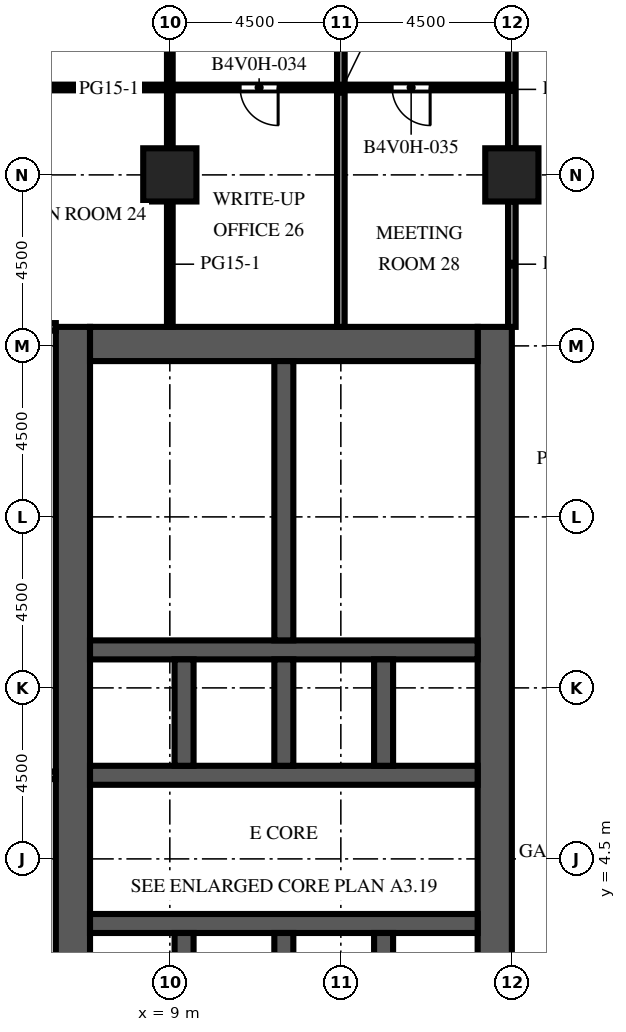
"""IFC4 building model, lengths in metres.
Left out: names, types, materials, properties, quantities, classifications, styles, units other than length and angle.
Written with IfcOpenShell. Run it as: python <this file> out.ifc"""

import sys

from ifc_helpers import new_model, si_unit, direction, frame, frame_2d, origin, origin_2d, place, context, subcontext, project, spatial, rectangle, extrude, element, fill, save


model = new_model("IFC4")
c1 = context("Model", 3, precision=1e-05, world=origin(), true_north=direction((0.0, 1.0)))
c2 = subcontext(c1, "Body", "Model", "MODEL_VIEW")
j1 = project(units=[si_unit("LENGTHUNIT", "METRE"), si_unit("PLANEANGLEUNIT", "RADIAN")], contexts=[c1])
p1 = place(None, origin())
s1 = spatial("IfcSite", under=j1, at=p1, CompositionType="ELEMENT")
p2 = place(p1, origin())
s2 = spatial("IfcBuilding", under=s1, at=p2, CompositionType="ELEMENT")
p3 = place(p2, frame((0.0, 0.0, 116.7)))
s3 = spatial("IfcBuildingStorey", under=s2, at=p3, CompositionType="ELEMENT", Elevation=116.7)
for number, where, z_axis, x_axis in (
    (1, (9.0, 22.5, 0.0), (0.0, 0.0, 1.0), (1.0, 0.0, 0.0)),
    (2, (18.0, 22.5, 0.0), (0.0, 0.0, 1.0), (1.0, 0.0, 0.0)),
):
    element("IfcColumn", number, at=place(p3, frame(where, z_axis=z_axis, x_axis=x_axis)), inside=s3, PredefinedType="COLUMN", context=c2, shape_type="SweptSolid", body=[
        extrude(rectangle(XDim=1.4, YDim=1.4, at=origin_2d()), origin(), (0.0, 0.0, 1.0), 4.1),
    ])
p4 = place(p3, frame((6.45, -9.0, 0.0), z_axis=(0.0, 0.0, 1.0), x_axis=(0.0, 1.0, 0.0)))
e3 = element("IfcWall", 3, at=p4, inside=s3, PredefinedType="SHEAR", context=c2, shape_type="SweptSolid", body=[
    extrude(rectangle(XDim=27.5, YDim=0.9, at=frame_2d((13.75, 0.0))), origin(), (0.0, 0.0, 1.0), 4.1),
])
p5 = place(p4, frame((12.55, 0.0, 0.0)))
e4 = element("IfcOpeningElement", 4, at=p5, cuts=e3, PredefinedType="OPENING", context=c2, shape_type="SweptSolid", body=[
    extrude(rectangle(XDim=2.4, YDim=2.4, at=frame_2d((1.2, 1.2))), frame((0.0, 0.46, 0.0), z_axis=(0.0, -1.0, 0.0), x_axis=(1.0, 0.0, 0.0)), (0.0, 0.0, 1.0), 0.92),
])
p6 = place(p4, frame((3.975, 0.0, 0.0)))
e5 = element("IfcOpeningElement", 5, at=p6, cuts=e3, PredefinedType="OPENING", context=c2, shape_type="SweptSolid", body=[
    extrude(rectangle(XDim=1.2, YDim=2.1, at=frame_2d((0.6, 1.05))), frame((0.0, 0.46, 0.0), z_axis=(0.0, -1.0, 0.0), x_axis=(1.0, 0.0, 0.0)), (0.0, 0.0, 1.0), 0.92),
])
p7 = place(p4, frame((19.485, 0.0, 0.0)))
e6 = element("IfcOpeningElement", 6, at=p7, cuts=e3, PredefinedType="OPENING", context=c2, shape_type="SweptSolid", body=[
    extrude(rectangle(XDim=1.0, YDim=2.1, at=frame_2d((0.5, 1.05))), frame((0.0, 0.46, 0.0), z_axis=(0.0, -1.0, 0.0), x_axis=(1.0, 0.0, 0.0)), (0.0, 0.0, 1.0), 0.92),
])
p8 = place(p4, frame((21.139, 0.0, 0.0)))
e7 = element("IfcOpeningElement", 7, at=p8, cuts=e3, PredefinedType="OPENING", context=c2, shape_type="SweptSolid", body=[
    extrude(rectangle(XDim=1.0, YDim=2.1, at=frame_2d((0.5, 1.05))), frame((0.0, 0.46, 0.0), z_axis=(0.0, -1.0, 0.0), x_axis=(1.0, 0.0, 0.0)), (0.0, 0.0, 1.0), 0.92),
])
p9 = place(p4, frame((23.16, 0.0, 0.0)))
e8 = element("IfcOpeningElement", 8, at=p9, cuts=e3, PredefinedType="OPENING", context=c2, shape_type="SweptSolid", body=[
    extrude(rectangle(XDim=1.0, YDim=2.1, at=frame_2d((0.5, 1.05))), frame((0.0, 0.46, 0.0), z_axis=(0.0, -1.0, 0.0), x_axis=(1.0, 0.0, 0.0)), (0.0, 0.0, 1.0), 0.92),
])
p10 = place(p4, frame((25.181, 0.0, 0.0)))
e9 = element("IfcOpeningElement", 9, at=p10, cuts=e3, PredefinedType="OPENING", context=c2, shape_type="SweptSolid", body=[
    extrude(rectangle(XDim=1.0, YDim=2.1, at=frame_2d((0.5, 1.05))), frame((0.0, 0.46, 0.0), z_axis=(0.0, -1.0, 0.0), x_axis=(1.0, 0.0, 0.0)), (0.0, 0.0, 1.0), 0.92),
])
p11 = place(p3, frame((17.55, -9.0, 0.0), z_axis=(0.0, 0.0, 1.0), x_axis=(0.0, 1.0, 0.0)))
e10 = element("IfcWall", 10, at=p11, inside=s3, PredefinedType="SHEAR", context=c2, shape_type="SweptSolid", body=[
    extrude(rectangle(XDim=27.5, YDim=0.9, at=frame_2d((13.75, 0.0))), origin(), (0.0, 0.0, 1.0), 4.1),
])
p12 = place(p11, frame((12.55, 0.0, 0.0)))
e11 = element("IfcOpeningElement", 11, at=p12, cuts=e10, PredefinedType="OPENING", context=c2, shape_type="SweptSolid", body=[
    extrude(rectangle(XDim=2.4, YDim=2.4, at=frame_2d((1.2, 1.2))), frame((0.0, 0.46, 0.0), z_axis=(0.0, -1.0, 0.0), x_axis=(1.0, 0.0, 0.0)), (0.0, 0.0, 1.0), 0.92),
])
p13 = place(p11, frame((6.825, 0.0, 0.0)))
e12 = element("IfcOpeningElement", 12, at=p13, cuts=e10, PredefinedType="OPENING", context=c2, shape_type="SweptSolid", body=[
    extrude(rectangle(XDim=1.2, YDim=2.1, at=frame_2d((0.6, 1.05))), frame((0.0, 0.46, 0.0), z_axis=(0.0, -1.0, 0.0), x_axis=(1.0, 0.0, 0.0)), (0.0, 0.0, 1.0), 0.92),
])
p14 = place(p11, frame((19.475, 0.0, 0.0)))
e13 = element("IfcOpeningElement", 13, at=p14, cuts=e10, PredefinedType="OPENING", context=c2, shape_type="SweptSolid", body=[
    extrude(rectangle(XDim=1.2, YDim=2.1, at=frame_2d((0.6, 1.05))), frame((0.0, 0.46, 0.0), z_axis=(0.0, -1.0, 0.0), x_axis=(1.0, 0.0, 0.0)), (0.0, 0.0, 1.0), 0.92),
])
p15 = place(p3, frame((6.9, 18.05, 0.0), z_axis=(0.0, 0.0, 1.0), x_axis=(1.0, 0.0, 0.0)))
e14 = element("IfcWall", 14, at=p15, inside=s3, PredefinedType="SHEAR", context=c2, shape_type="SweptSolid", body=[
    extrude(rectangle(XDim=10.2, YDim=0.9, at=frame_2d((5.1, 0.0))), origin(), (0.0, 0.0, 1.0), 4.1),
])
p16 = place(p3, frame((6.9, 2.8, 0.0), z_axis=(0.0, 0.0, 1.0), x_axis=(1.0, 0.0, 0.0)))
e15 = element("IfcWall", 15, at=p16, inside=s3, PredefinedType="SHEAR", context=c2, shape_type="SweptSolid", body=[
    extrude(rectangle(XDim=10.2, YDim=0.5, at=frame_2d((5.1, 0.0))), origin(), (0.0, 0.0, 1.0), 4.1),
])
p17 = place(p16, frame((0.562, 0.0, 0.0)))
e16 = element("IfcOpeningElement", 16, at=p17, cuts=e15, PredefinedType="OPENING", context=c2, shape_type="SweptSolid", body=[
    extrude(rectangle(XDim=1.1, YDim=2.1, at=frame_2d((0.55, 1.05))), frame((0.0, 0.26, 0.0), z_axis=(0.0, -1.0, 0.0), x_axis=(1.0, 0.0, 0.0)), (0.0, 0.0, 1.0), 0.52),
])
p18 = place(p16, frame((3.238, 0.0, 0.0)))
e17 = element("IfcOpeningElement", 17, at=p18, cuts=e15, PredefinedType="OPENING", context=c2, shape_type="SweptSolid", body=[
    extrude(rectangle(XDim=1.1, YDim=2.1, at=frame_2d((0.55, 1.05))), frame((0.0, 0.26, 0.0), z_axis=(0.0, -1.0, 0.0), x_axis=(1.0, 0.0, 0.0)), (0.0, 0.0, 1.0), 0.52),
])
p19 = place(p16, frame((8.538, 0.0, 0.0)))
e18 = element("IfcOpeningElement", 18, at=p19, cuts=e15, PredefinedType="OPENING", context=c2, shape_type="SweptSolid", body=[
    extrude(rectangle(XDim=1.1, YDim=2.1, at=frame_2d((0.55, 1.05))), frame((0.0, 0.26, 0.0), z_axis=(0.0, -1.0, 0.0), x_axis=(1.0, 0.0, 0.0)), (0.0, 0.0, 1.0), 0.52),
])
p20 = place(p3, frame((6.9, 6.7, 0.0), z_axis=(0.0, 0.0, 1.0), x_axis=(1.0, 0.0, 0.0)))
e19 = element("IfcWall", 19, at=p20, inside=s3, PredefinedType="SHEAR", context=c2, shape_type="SweptSolid", body=[
    extrude(rectangle(XDim=10.2, YDim=0.5, at=frame_2d((5.1, 0.0))), origin(), (0.0, 0.0, 1.0), 4.1),
])
p21 = place(p20, frame((0.562, 0.0, 0.0)))
e20 = element("IfcOpeningElement", 20, at=p21, cuts=e19, PredefinedType="OPENING", context=c2, shape_type="SweptSolid", body=[
    extrude(rectangle(XDim=1.1, YDim=2.1, at=frame_2d((0.55, 1.05))), frame((0.0, 0.26, 0.0), z_axis=(0.0, -1.0, 0.0), x_axis=(1.0, 0.0, 0.0)), (0.0, 0.0, 1.0), 0.52),
])
p22 = place(p20, frame((3.288, 0.0, 0.0)))
e21 = element("IfcOpeningElement", 21, at=p22, cuts=e19, PredefinedType="OPENING", context=c2, shape_type="SweptSolid", body=[
    extrude(rectangle(XDim=1.0, YDim=2.1, at=frame_2d((0.5, 1.05))), frame((0.0, 0.26, 0.0), z_axis=(0.0, -1.0, 0.0), x_axis=(1.0, 0.0, 0.0)), (0.0, 0.0, 1.0), 0.52),
])
p23 = place(p20, frame((5.913, 0.0, 0.0)))
e22 = element("IfcOpeningElement", 22, at=p23, cuts=e19, PredefinedType="OPENING", context=c2, shape_type="SweptSolid", body=[
    extrude(rectangle(XDim=1.0, YDim=2.1, at=frame_2d((0.5, 1.05))), frame((0.0, 0.26, 0.0), z_axis=(0.0, -1.0, 0.0), x_axis=(1.0, 0.0, 0.0)), (0.0, 0.0, 1.0), 0.52),
])
p24 = place(p20, frame((8.587, 0.0, 0.0)))
e23 = element("IfcOpeningElement", 23, at=p24, cuts=e19, PredefinedType="OPENING", context=c2, shape_type="SweptSolid", body=[
    extrude(rectangle(XDim=1.0, YDim=2.1, at=frame_2d((0.5, 1.05))), frame((0.0, 0.26, 0.0), z_axis=(0.0, -1.0, 0.0), x_axis=(1.0, 0.0, 0.0)), (0.0, 0.0, 1.0), 0.52),
])
p25 = place(p3, frame((6.9, 10.0, 0.0), z_axis=(0.0, 0.0, 1.0), x_axis=(1.0, 0.0, 0.0)))
e24 = element("IfcWall", 24, at=p25, inside=s3, PredefinedType="SHEAR", context=c2, shape_type="SweptSolid", body=[
    extrude(rectangle(XDim=10.2, YDim=0.5, at=frame_2d((5.1, 0.0))), origin(), (0.0, 0.0, 1.0), 4.1),
])
for number, where, z_axis, x_axis in (
    (25, (9.375, -0.25, 0.0), (0.0, 0.0, 1.0), (0.0, 1.0, 0.0)),
    (26, (9.375, 6.95, 0.0), (0.0, 0.0, 1.0), (0.0, 1.0, 0.0)),
    (27, (12.0, -0.25, 0.0), (0.0, 0.0, 1.0), (0.0, 1.0, 0.0)),
    (28, (12.0, 6.95, 0.0), (0.0, 0.0, 1.0), (0.0, 1.0, 0.0)),
    (29, (14.625, -0.25, 0.0), (0.0, 0.0, 1.0), (0.0, 1.0, 0.0)),
    (30, (14.625, 6.95, 0.0), (0.0, 0.0, 1.0), (0.0, 1.0, 0.0)),
):
    element("IfcWall", number, at=place(p3, frame(where, z_axis=z_axis, x_axis=x_axis)), inside=s3, PredefinedType="SHEAR", context=c2, shape_type="SweptSolid", body=[
        extrude(rectangle(XDim=2.8, YDim=0.5, at=frame_2d((1.4, 0.0))), origin(), (0.0, 0.0, 1.0), 4.1),
    ])
p26 = place(p3, frame((12.0, 10.25, 0.0), z_axis=(0.0, 0.0, 1.0), x_axis=(0.0, 1.0, 0.0)))
e31 = element("IfcWall", 31, at=p26, inside=s3, PredefinedType="SHEAR", context=c2, shape_type="SweptSolid", body=[
    extrude(rectangle(XDim=7.35, YDim=0.5, at=frame_2d((3.675, 0.0))), origin(), (0.0, 0.0, 1.0), 4.1),
])
for number, where, z_axis, x_axis in (
    (32, (6.9, 11.72, 0.0), (0.0, 0.0, 1.0), (1.0, 0.0, 0.0)),
    (33, (6.9, 13.558, 0.0), (0.0, 0.0, 1.0), (1.0, 0.0, 0.0)),
    (34, (6.9, 15.762, 0.0), (0.0, 0.0, 1.0), (1.0, 0.0, 0.0)),
):
    element("IfcWall", number, at=place(p3, frame(where, z_axis=z_axis, x_axis=x_axis)), inside=s3, PredefinedType="PARTITIONING", context=c2, shape_type="SweptSolid", body=[
        extrude(rectangle(XDim=4.85, YDim=0.1, at=frame_2d((2.425, 0.0))), origin(), (0.0, 0.0, 1.0), 3.65),
    ])
p27 = place(p3, frame((9.0, 18.5, 0.0), z_axis=(0.0, 0.0, 1.0), x_axis=(0.0, 1.0, 0.0)))
e35 = element("IfcWall", 35, at=p27, inside=s3, PredefinedType="PARTITIONING", context=c2, shape_type="SweptSolid", body=[
    extrude(rectangle(XDim=3.3, YDim=0.15, at=frame_2d((1.65, 0.0))), origin(), (0.0, 0.0, 1.0), 3.65),
])
p28 = place(p3, frame((9.0, 23.2, 0.0), z_axis=(0.0, 0.0, 1.0), x_axis=(0.0, 1.0, 0.0)))
e36 = element("IfcWall", 36, at=p28, inside=s3, PredefinedType="PARTITIONING", context=c2, shape_type="SweptSolid", body=[
    extrude(rectangle(XDim=3.1, YDim=0.15, at=frame_2d((1.55, 0.0))), origin(), (0.0, 0.0, 1.0), 3.65),
])
p29 = place(p3, frame((13.5, 18.5, 0.0), z_axis=(0.0, 0.0, 1.0), x_axis=(0.0, 1.0, 0.0)))
e37 = element("IfcWall", 37, at=p29, inside=s3, PredefinedType="PARTITIONING", context=c2, shape_type="SweptSolid", body=[
    extrude(rectangle(XDim=12.4, YDim=0.2, at=frame_2d((6.2, 0.0))), origin(), (0.0, 0.0, 1.0), 3.65),
])
p30 = place(p3, frame((18.0, 18.5, 0.0), z_axis=(0.0, 0.0, 1.0), x_axis=(0.0, 1.0, 0.0)))
e38 = element("IfcWall", 38, at=p30, inside=s3, PredefinedType="PARTITIONING", context=c2, shape_type="SweptSolid", body=[
    extrude(rectangle(XDim=3.3, YDim=0.2, at=frame_2d((1.65, 0.0))), origin(), (0.0, 0.0, 1.0), 3.65),
])
p31 = place(p3, frame((18.0, 23.2, 0.0), z_axis=(0.0, 0.0, 1.0), x_axis=(0.0, 1.0, 0.0)))
e39 = element("IfcWall", 39, at=p31, inside=s3, PredefinedType="PARTITIONING", context=c2, shape_type="SweptSolid", body=[
    extrude(rectangle(XDim=3.1, YDim=0.2, at=frame_2d((1.55, 0.0))), origin(), (0.0, 0.0, 1.0), 3.65),
])
p32 = place(p3, frame((1.5, 6.7, 0.0), z_axis=(0.0, 0.0, 1.0), x_axis=(1.0, 0.0, 0.0)))
e40 = element("IfcWall", 40, at=p32, inside=s3, PredefinedType="PARTITIONING", context=c2, shape_type="SweptSolid", body=[
    extrude(rectangle(XDim=4.5, YDim=0.2, at=frame_2d((2.25, 0.0))), origin(), (0.0, 0.0, 1.0), 3.65),
])
p33 = place(p32, frame((1.6, 0.0, 0.0)))
e41 = element("IfcOpeningElement", 41, at=p33, cuts=e40, PredefinedType="OPENING", context=c2, shape_type="SweptSolid", body=[
    extrude(rectangle(XDim=1.0, YDim=2.1, at=frame_2d((0.5, 1.05))), frame((0.0, 0.11, 0.0), z_axis=(0.0, -1.0, 0.0), x_axis=(1.0, 0.0, 0.0)), (0.0, 0.0, 1.0), 0.22),
])
p34 = place(p3, frame((1.5, 18.5, 0.0), z_axis=(0.0, 0.0, 1.0), x_axis=(1.0, 0.0, 0.0)))
e42 = element("IfcWall", 42, at=p34, inside=s3, PredefinedType="PARTITIONING", context=c2, shape_type="SweptSolid", body=[
    extrude(rectangle(XDim=4.5, YDim=0.2, at=frame_2d((2.25, 0.0))), origin(), (0.0, 0.0, 1.0), 3.65),
])
p35 = place(p3, frame((18.0, 24.8, 0.0), z_axis=(0.0, 0.0, 1.0), x_axis=(-1.0, 0.0, 0.0)))
e43 = element("IfcWall", 43, at=p35, inside=s3, PredefinedType="PARTITIONING", context=c2, shape_type="SweptSolid", body=[
    extrude(rectangle(XDim=28.5, YDim=0.15, at=frame_2d((14.25, 0.0))), origin(), (0.0, 0.0, 1.0), 3.65),
])
p36 = place(p35, frame((21.4, 0.0, 0.0)))
e44 = element("IfcOpeningElement", 44, at=p36, cuts=e43, PredefinedType="OPENING", context=c2, shape_type="SweptSolid", body=[
    extrude(rectangle(XDim=1.0, YDim=2.1, at=frame_2d((0.5, 1.05))), frame((0.0, 0.085, 0.0), z_axis=(0.0, -1.0, 0.0), x_axis=(1.0, 0.0, 0.0)), (0.0, 0.0, 1.0), 0.17),
])
p37 = place(p35, frame((13.4, 0.0, 0.0)))
e45 = element("IfcOpeningElement", 45, at=p37, cuts=e43, PredefinedType="OPENING", context=c2, shape_type="SweptSolid", body=[
    extrude(rectangle(XDim=1.0, YDim=2.1, at=frame_2d((0.5, 1.05))), frame((0.0, 0.085, 0.0), z_axis=(0.0, -1.0, 0.0), x_axis=(1.0, 0.0, 0.0)), (0.0, 0.0, 1.0), 0.17),
])
p38 = place(p35, frame((6.15, 0.0, 0.0)))
e46 = element("IfcOpeningElement", 46, at=p38, cuts=e43, PredefinedType="OPENING", context=c2, shape_type="SweptSolid", body=[
    extrude(rectangle(XDim=1.0, YDim=2.1, at=frame_2d((0.5, 1.05))), frame((0.0, 0.085, 0.0), z_axis=(0.0, -1.0, 0.0), x_axis=(1.0, 0.0, 0.0)), (0.0, 0.0, 1.0), 0.17),
])
p39 = place(p35, frame((2.15, 0.0, 0.0)))
e47 = element("IfcOpeningElement", 47, at=p39, cuts=e43, PredefinedType="OPENING", context=c2, shape_type="SweptSolid", body=[
    extrude(rectangle(XDim=1.0, YDim=2.1, at=frame_2d((0.5, 1.05))), frame((0.0, 0.085, 0.0), z_axis=(0.0, -1.0, 0.0), x_axis=(1.0, 0.0, 0.0)), (0.0, 0.0, 1.0), 0.17),
])
p40 = place(p17, origin())
e48 = element("IfcDoor", 48, at=p40, inside=s3, OperationType="DOUBLE_DOOR_SLIDING", PredefinedType="DOOR", context=c2, shape_type="SweptSolid", body=[
    extrude(rectangle(XDim=1.1, YDim=2.1, at=frame_2d((0.55, 1.05))), frame((0.0, 0.025, 0.0), z_axis=(0.0, -1.0, 0.0), x_axis=(1.0, 0.0, 0.0)), (0.0, 0.0, 1.0), 0.05),
])
fill(e16, e48)
p41 = place(p18, origin())
e49 = element("IfcDoor", 49, at=p41, inside=s3, OperationType="DOUBLE_DOOR_SLIDING", PredefinedType="DOOR", context=c2, shape_type="SweptSolid", body=[
    extrude(rectangle(XDim=1.1, YDim=2.1, at=frame_2d((0.55, 1.05))), frame((0.0, 0.025, 0.0), z_axis=(0.0, -1.0, 0.0), x_axis=(1.0, 0.0, 0.0)), (0.0, 0.0, 1.0), 0.05),
])
fill(e17, e49)
p42 = place(p19, origin())
e50 = element("IfcDoor", 50, at=p42, inside=s3, OperationType="DOUBLE_DOOR_SLIDING", PredefinedType="DOOR", context=c2, shape_type="SweptSolid", body=[
    extrude(rectangle(XDim=1.1, YDim=2.1, at=frame_2d((0.55, 1.05))), frame((0.0, 0.025, 0.0), z_axis=(0.0, -1.0, 0.0), x_axis=(1.0, 0.0, 0.0)), (0.0, 0.0, 1.0), 0.05),
])
fill(e18, e50)
p43 = place(p21, origin())
e51 = element("IfcDoor", 51, at=p43, inside=s3, OperationType="DOUBLE_DOOR_SLIDING", PredefinedType="DOOR", context=c2, shape_type="SweptSolid", body=[
    extrude(rectangle(XDim=1.1, YDim=2.1, at=frame_2d((0.55, 1.05))), frame((0.0, 0.025, 0.0), z_axis=(0.0, -1.0, 0.0), x_axis=(1.0, 0.0, 0.0)), (0.0, 0.0, 1.0), 0.05),
])
fill(e20, e51)
p44 = place(p5, origin())
e52 = element("IfcDoor", 52, at=p44, inside=s3, OperationType="DOUBLE_DOOR_DOUBLE_SWING", PredefinedType="DOOR", context=c2, shape_type="SweptSolid", body=[
    extrude(rectangle(XDim=2.4, YDim=2.4, at=frame_2d((1.2, 1.2))), frame((0.0, 0.025, 0.0), z_axis=(0.0, -1.0, 0.0), x_axis=(1.0, 0.0, 0.0)), (0.0, 0.0, 1.0), 0.05),
])
fill(e4, e52)
p45 = place(p12, origin())
e53 = element("IfcDoor", 53, at=p45, inside=s3, OperationType="DOUBLE_DOOR_DOUBLE_SWING", PredefinedType="DOOR", context=c2, shape_type="SweptSolid", body=[
    extrude(rectangle(XDim=2.4, YDim=2.4, at=frame_2d((1.2, 1.2))), frame((0.0, 0.025, 0.0), z_axis=(0.0, -1.0, 0.0), x_axis=(1.0, 0.0, 0.0)), (0.0, 0.0, 1.0), 0.05),
])
fill(e11, e53)
p46 = place(p14, frame((1.2, 0.0, 0.0), z_axis=(0.0, 0.0, 1.0), x_axis=(-1.0, 0.0, 0.0)))
e54 = element("IfcDoor", 54, at=p46, inside=s3, OperationType="SINGLE_SWING_LEFT", PredefinedType="DOOR", context=c2, shape_type="SweptSolid", body=[
    extrude(rectangle(XDim=1.2, YDim=2.1, at=frame_2d((0.6, 1.05))), frame((0.0, 0.025, 0.0), z_axis=(0.0, -1.0, 0.0), x_axis=(1.0, 0.0, 0.0)), (0.0, 0.0, 1.0), 0.05),
])
fill(e13, e54)
p47 = place(p22, origin())
e55 = element("IfcDoor", 55, at=p47, inside=s3, OperationType="SINGLE_SWING_RIGHT", PredefinedType="DOOR", context=c2, shape_type="SweptSolid", body=[
    extrude(rectangle(XDim=1.0, YDim=2.1, at=frame_2d((0.5, 1.05))), frame((0.0, 0.025, 0.0), z_axis=(0.0, -1.0, 0.0), x_axis=(1.0, 0.0, 0.0)), (0.0, 0.0, 1.0), 0.05),
])
fill(e21, e55)
p48 = place(p23, origin())
e56 = element("IfcDoor", 56, at=p48, inside=s3, OperationType="SINGLE_SWING_LEFT", PredefinedType="DOOR", context=c2, shape_type="SweptSolid", body=[
    extrude(rectangle(XDim=1.0, YDim=2.1, at=frame_2d((0.5, 1.05))), frame((0.0, 0.025, 0.0), z_axis=(0.0, -1.0, 0.0), x_axis=(1.0, 0.0, 0.0)), (0.0, 0.0, 1.0), 0.05),
])
fill(e22, e56)
p49 = place(p24, origin())
e57 = element("IfcDoor", 57, at=p49, inside=s3, OperationType="SINGLE_SWING_RIGHT", PredefinedType="DOOR", context=c2, shape_type="SweptSolid", body=[
    extrude(rectangle(XDim=1.0, YDim=2.1, at=frame_2d((0.5, 1.05))), frame((0.0, 0.025, 0.0), z_axis=(0.0, -1.0, 0.0), x_axis=(1.0, 0.0, 0.0)), (0.0, 0.0, 1.0), 0.05),
])
fill(e23, e57)
p50 = place(p7, origin())
e58 = element("IfcDoor", 58, at=p50, inside=s3, OperationType="SINGLE_SWING_RIGHT", PredefinedType="DOOR", context=c2, shape_type="SweptSolid", body=[
    extrude(rectangle(XDim=1.0, YDim=2.1, at=frame_2d((0.5, 1.05))), frame((0.0, -0.375, 0.0), z_axis=(0.0, -1.0, 0.0), x_axis=(1.0, 0.0, 0.0)), (0.0, 0.0, 1.0), 0.05),
])
fill(e6, e58)
p51 = place(p8, origin())
e59 = element("IfcDoor", 59, at=p51, inside=s3, OperationType="SINGLE_SWING_LEFT", PredefinedType="DOOR", context=c2, shape_type="SweptSolid", body=[
    extrude(rectangle(XDim=1.0, YDim=2.1, at=frame_2d((0.5, 1.05))), frame((0.0, -0.375, 0.0), z_axis=(0.0, -1.0, 0.0), x_axis=(1.0, 0.0, 0.0)), (0.0, 0.0, 1.0), 0.05),
])
fill(e7, e59)
p52 = place(p9, origin())
e60 = element("IfcDoor", 60, at=p52, inside=s3, OperationType="SINGLE_SWING_RIGHT", PredefinedType="DOOR", context=c2, shape_type="SweptSolid", body=[
    extrude(rectangle(XDim=1.0, YDim=2.1, at=frame_2d((0.5, 1.05))), frame((0.0, -0.375, 0.0), z_axis=(0.0, -1.0, 0.0), x_axis=(1.0, 0.0, 0.0)), (0.0, 0.0, 1.0), 0.05),
])
fill(e8, e60)
p53 = place(p10, origin())
e61 = element("IfcDoor", 61, at=p53, inside=s3, OperationType="SINGLE_SWING_LEFT", PredefinedType="DOOR", context=c2, shape_type="SweptSolid", body=[
    extrude(rectangle(XDim=1.0, YDim=2.1, at=frame_2d((0.5, 1.05))), frame((0.0, -0.375, 0.0), z_axis=(0.0, -1.0, 0.0), x_axis=(1.0, 0.0, 0.0)), (0.0, 0.0, 1.0), 0.05),
])
fill(e9, e61)
p54 = place(p38, origin())
e62 = element("IfcDoor", 62, at=p54, inside=s3, OperationType="SINGLE_SWING_LEFT", PredefinedType="DOOR", context=c2, shape_type="SweptSolid", body=[
    extrude(rectangle(XDim=1.0, YDim=2.1, at=frame_2d((0.5, 1.05))), frame((0.0, 0.025, 0.0), z_axis=(0.0, -1.0, 0.0), x_axis=(1.0, 0.0, 0.0)), (0.0, 0.0, 1.0), 0.05),
])
fill(e46, e62)
p55 = place(p39, origin())
e63 = element("IfcDoor", 63, at=p55, inside=s3, OperationType="SINGLE_SWING_LEFT", PredefinedType="DOOR", context=c2, shape_type="SweptSolid", body=[
    extrude(rectangle(XDim=1.0, YDim=2.1, at=frame_2d((0.5, 1.05))), frame((0.0, 0.025, 0.0), z_axis=(0.0, -1.0, 0.0), x_axis=(1.0, 0.0, 0.0)), (0.0, 0.0, 1.0), 0.05),
])
fill(e47, e63)
save(model, sys.argv[1])
